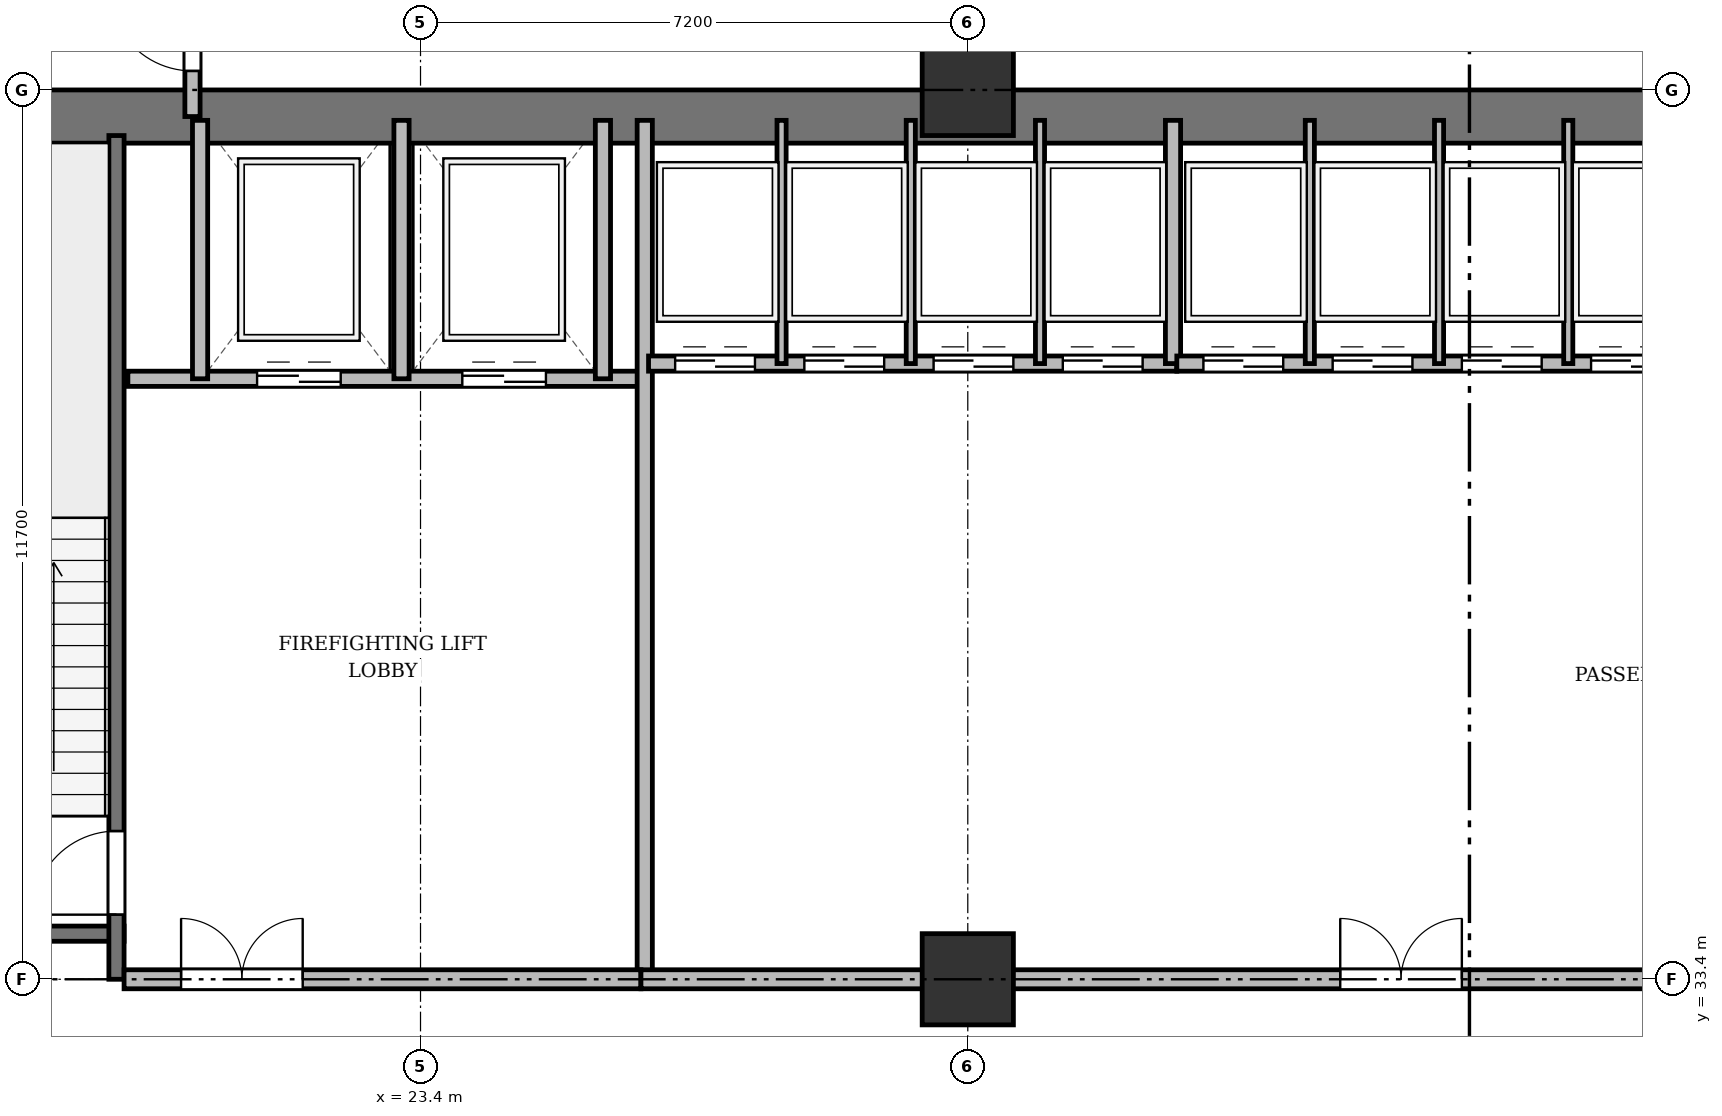
"""IFC4 building model, lengths in metres.
Left out: names, types, materials, properties, quantities, classifications, styles, units other than length and angle.
Written with IfcOpenShell. Run it as: python <this file> out.ifc"""

import sys

from ifc_helpers import new_model, si_unit, direction, frame, frame_2d, origin, origin_2d, place, context, subcontext, project, spatial, rectangle, extrude, source, transform, mapped, element, fill, save


model = new_model("IFC4")
c1 = context("Model", 3, precision=1e-05, world=origin(), true_north=direction((0.0, 1.0)))
c2 = subcontext(c1, "Body", "Model", "MODEL_VIEW")
j1 = project(units=[si_unit("LENGTHUNIT", "METRE"), si_unit("PLANEANGLEUNIT", "RADIAN")], contexts=[c1])
p1 = place(None, origin())
s1 = spatial("IfcSite", under=j1, at=p1, CompositionType="ELEMENT")
p2 = place(p1, origin())
s2 = spatial("IfcBuilding", under=s1, at=p2, CompositionType="ELEMENT")
p3 = place(p2, origin())
s3 = spatial("IfcBuildingStorey", under=s2, at=p3, CompositionType="ELEMENT", Elevation=0.0)
m1 = source(origin(), c2, "Body", "SweptSolid", [
    extrude(rectangle(XDim=1.2, YDim=1.2, at=origin_2d()), origin(), (0.0, 0.0, 1.0), 5.2),
])
for number, where, z_axis, x_axis in (
    (1, (30.6, 33.4, 0.0), (0.0, 0.0, 1.0), (1.0, 0.0, 0.0)),
    (2, (30.6, 45.1, 0.0), (0.0, 0.0, 1.0), (1.0, 0.0, 0.0)),
):
    element("IfcColumn", number, at=place(p3, frame(where, z_axis=z_axis, x_axis=x_axis)), inside=s3, PredefinedType="COLUMN", context=c2, shape_type="MappedRepresentation", body=[
        mapped(m1, transform((0.0, 0.0, 0.0), x_axis=(1.0, 0.0, 0.0), y_axis=(0.0, 1.0, 0.0), z_axis=(0.0, 0.0, 1.0), scale=1.0)),
    ])
p4 = place(p3, frame((15.5, 44.75, 0.0), z_axis=(0.0, 0.0, 1.0), x_axis=(1.0, 0.0, 0.0)))
e3 = element("IfcWall", 3, at=p4, inside=s3, PredefinedType="SHEAR", context=c2, shape_type="SweptSolid", body=[
    extrude(rectangle(XDim=43.4, YDim=0.7, at=frame_2d((21.7, 0.0))), origin(), (0.0, 0.0, 1.0), 4.88),
])
p5 = place(p3, frame((16.1, 34.0, 0.0), z_axis=(0.0, 0.0, 1.0), x_axis=(1.0, 0.0, 0.0)))
e4 = element("IfcWall", 4, at=p5, inside=s3, PredefinedType="SHEAR", context=c2, shape_type="SweptSolid", body=[
    extrude(rectangle(XDim=3.4, YDim=0.2, at=frame_2d((1.7, 0.0))), origin(), (0.0, 0.0, 1.0), 4.88),
])
p6 = place(p3, frame((19.4, 33.4, 0.0), z_axis=(0.0, 0.0, 1.0), x_axis=(0.0, 1.0, 0.0)))
e5 = element("IfcWall", 5, at=p6, inside=s3, PredefinedType="SHEAR", context=c2, shape_type="SweptSolid", body=[
    extrude(rectangle(XDim=11.1, YDim=0.2, at=frame_2d((5.55, 0.0))), origin(), (0.0, 0.0, 1.0), 4.88),
])
p7 = place(p6, frame((0.85, 0.0, 0.0)))
e6 = element("IfcOpeningElement", 6, at=p7, cuts=e5, PredefinedType="OPENING", context=c2, shape_type="SweptSolid", body=[
    extrude(rectangle(XDim=1.1, YDim=2.15, at=frame_2d((0.55, 1.075))), frame((0.0, 0.11, 0.0), z_axis=(0.0, -1.0, 0.0), x_axis=(1.0, 0.0, 0.0)), (0.0, 0.0, 1.0), 0.22),
])
p8 = place(p3, frame((19.55, 41.3, 0.0), z_axis=(0.0, 0.0, 1.0), x_axis=(1.0, 0.0, 0.0)))
e7 = element("IfcWall", 7, at=p8, inside=s3, PredefinedType="SOLIDWALL", context=c2, shape_type="SweptSolid", body=[
    extrude(rectangle(XDim=6.75, YDim=0.2, at=frame_2d((3.375, 0.0))), origin(), (0.0, 0.0, 1.0), 4.88),
])
p9 = place(p8, frame((1.7, 0.0, 0.0)))
e8 = element("IfcOpeningElement", 8, at=p9, cuts=e7, PredefinedType="OPENING", context=c2, shape_type="SweptSolid", body=[
    extrude(rectangle(XDim=1.1, YDim=2.15, at=frame_2d((0.55, 1.075))), frame((0.0, 0.11, 0.0), z_axis=(0.0, -1.0, 0.0), x_axis=(1.0, 0.0, 0.0)), (0.0, 0.0, 1.0), 0.22),
])
p10 = place(p8, frame((4.4, 0.0, 0.0)))
e9 = element("IfcOpeningElement", 9, at=p10, cuts=e7, PredefinedType="OPENING", context=c2, shape_type="SweptSolid", body=[
    extrude(rectangle(XDim=1.1, YDim=2.15, at=frame_2d((0.55, 1.075))), frame((0.0, 0.11, 0.0), z_axis=(0.0, -1.0, 0.0), x_axis=(1.0, 0.0, 0.0)), (0.0, 0.0, 1.0), 0.22),
])
for number, where, z_axis, x_axis in (
    (10, (20.5, 41.3, 0.0), (0.0, 0.0, 1.0), (0.0, 1.0, 0.0)),
    (11, (23.15, 41.3, 0.0), (0.0, 0.0, 1.0), (0.0, 1.0, 0.0)),
    (12, (25.8, 41.3, 0.0), (0.0, 0.0, 1.0), (0.0, 1.0, 0.0)),
):
    element("IfcWall", number, at=place(p3, frame(where, z_axis=z_axis, x_axis=x_axis)), inside=s3, PredefinedType="SOLIDWALL", context=c2, shape_type="SweptSolid", body=[
        extrude(rectangle(XDim=3.4, YDim=0.2, at=frame_2d((1.7, 0.0))), origin(), (0.0, 0.0, 1.0), 4.88),
    ])
p11 = place(p3, frame((26.35, 33.4, 0.0), z_axis=(0.0, 0.0, 1.0), x_axis=(0.0, 1.0, 0.0)))
e13 = element("IfcWall", 13, at=p11, inside=s3, PredefinedType="SOLIDWALL", context=c2, shape_type="SweptSolid", body=[
    extrude(rectangle(XDim=11.3, YDim=0.2, at=frame_2d((5.65, 0.0))), origin(), (0.0, 0.0, 1.0), 3.78),
])
p12 = place(p3, frame((19.5, 33.4, 0.0), z_axis=(0.0, 0.0, 1.0), x_axis=(1.0, 0.0, 0.0)))
e14 = element("IfcWall", 14, at=p12, inside=s3, PredefinedType="PARTITIONING", context=c2, shape_type="SweptSolid", body=[
    extrude(rectangle(XDim=6.8, YDim=0.25, at=frame_2d((3.4, 0.0))), origin(), (0.0, 0.0, 1.0), 3.78),
])
p13 = place(p12, frame((0.75, 0.0, 0.0)))
e15 = element("IfcOpeningElement", 15, at=p13, cuts=e14, PredefinedType="OPENING", context=c2, shape_type="SweptSolid", body=[
    extrude(rectangle(XDim=1.6, YDim=2.2, at=frame_2d((0.8, 1.1))), frame((0.0, 0.135, 0.0), z_axis=(0.0, -1.0, 0.0), x_axis=(1.0, 0.0, 0.0)), (0.0, 0.0, 1.0), 0.27),
])
p14 = place(p3, frame((26.4, 41.5, 0.0), z_axis=(0.0, 0.0, 1.0), x_axis=(1.0, 0.0, 0.0)))
e16 = element("IfcWall", 16, at=p14, inside=s3, PredefinedType="SOLIDWALL", context=c2, shape_type="SweptSolid", body=[
    extrude(rectangle(XDim=6.95, YDim=0.2, at=frame_2d((3.475, 0.0))), origin(), (0.0, 0.0, 1.0), 4.88),
])
p15 = place(p14, frame((0.35, 0.0, 0.0)))
e17 = element("IfcOpeningElement", 17, at=p15, cuts=e16, PredefinedType="OPENING", context=c2, shape_type="SweptSolid", body=[
    extrude(rectangle(XDim=1.05, YDim=2.15, at=frame_2d((0.525, 1.075))), frame((0.0, 0.11, 0.0), z_axis=(0.0, -1.0, 0.0), x_axis=(1.0, 0.0, 0.0)), (0.0, 0.0, 1.0), 0.22),
])
p16 = place(p14, frame((2.05, 0.0, 0.0)))
e18 = element("IfcOpeningElement", 18, at=p16, cuts=e16, PredefinedType="OPENING", context=c2, shape_type="SweptSolid", body=[
    extrude(rectangle(XDim=1.05, YDim=2.15, at=frame_2d((0.525, 1.075))), frame((0.0, 0.11, 0.0), z_axis=(0.0, -1.0, 0.0), x_axis=(1.0, 0.0, 0.0)), (0.0, 0.0, 1.0), 0.22),
])
p17 = place(p14, frame((3.75, 0.0, 0.0)))
e19 = element("IfcOpeningElement", 19, at=p17, cuts=e16, PredefinedType="OPENING", context=c2, shape_type="SweptSolid", body=[
    extrude(rectangle(XDim=1.05, YDim=2.15, at=frame_2d((0.525, 1.075))), frame((0.0, 0.11, 0.0), z_axis=(0.0, -1.0, 0.0), x_axis=(1.0, 0.0, 0.0)), (0.0, 0.0, 1.0), 0.22),
])
p18 = place(p14, frame((5.45, 0.0, 0.0)))
e20 = element("IfcOpeningElement", 20, at=p18, cuts=e16, PredefinedType="OPENING", context=c2, shape_type="SweptSolid", body=[
    extrude(rectangle(XDim=1.05, YDim=2.15, at=frame_2d((0.525, 1.075))), frame((0.0, 0.11, 0.0), z_axis=(0.0, -1.0, 0.0), x_axis=(1.0, 0.0, 0.0)), (0.0, 0.0, 1.0), 0.22),
])
p19 = place(p3, frame((33.3, 41.5, 0.0), z_axis=(0.0, 0.0, 1.0), x_axis=(0.0, 1.0, 0.0)))
e21 = element("IfcWall", 21, at=p19, inside=s3, PredefinedType="SOLIDWALL", context=c2, shape_type="SweptSolid", body=[
    extrude(rectangle(XDim=3.2, YDim=0.2, at=frame_2d((1.6, 0.0))), origin(), (0.0, 0.0, 1.0), 4.88),
])
for number, where, z_axis, x_axis in (
    (22, (28.15, 41.5, 0.0), (0.0, 0.0, 1.0), (0.0, 1.0, 0.0)),
    (23, (29.85, 41.5, 0.0), (0.0, 0.0, 1.0), (0.0, 1.0, 0.0)),
    (24, (31.55, 41.5, 0.0), (0.0, 0.0, 1.0), (0.0, 1.0, 0.0)),
):
    element("IfcWall", number, at=place(p3, frame(where, z_axis=z_axis, x_axis=x_axis)), inside=s3, PredefinedType="PARTITIONING", context=c2, shape_type="SweptSolid", body=[
        extrude(rectangle(XDim=3.2, YDim=0.12, at=frame_2d((1.6, 0.0))), origin(), (0.0, 0.0, 1.0), 4.88),
    ])
p20 = place(p3, frame((33.35, 41.5, 0.0), z_axis=(0.0, 0.0, 1.0), x_axis=(1.0, 0.0, 0.0)))
e25 = element("IfcWall", 25, at=p20, inside=s3, PredefinedType="SOLIDWALL", context=c2, shape_type="SweptSolid", body=[
    extrude(rectangle(XDim=6.9, YDim=0.2, at=frame_2d((3.45, 0.0))), origin(), (0.0, 0.0, 1.0), 4.88),
])
p21 = place(p20, frame((0.35, 0.0, 0.0)))
e26 = element("IfcOpeningElement", 26, at=p21, cuts=e25, PredefinedType="OPENING", context=c2, shape_type="SweptSolid", body=[
    extrude(rectangle(XDim=1.05, YDim=2.15, at=frame_2d((0.525, 1.075))), frame((0.0, 0.11, 0.0), z_axis=(0.0, -1.0, 0.0), x_axis=(1.0, 0.0, 0.0)), (0.0, 0.0, 1.0), 0.22),
])
p22 = place(p20, frame((2.05, 0.0, 0.0)))
e27 = element("IfcOpeningElement", 27, at=p22, cuts=e25, PredefinedType="OPENING", context=c2, shape_type="SweptSolid", body=[
    extrude(rectangle(XDim=1.05, YDim=2.15, at=frame_2d((0.525, 1.075))), frame((0.0, 0.11, 0.0), z_axis=(0.0, -1.0, 0.0), x_axis=(1.0, 0.0, 0.0)), (0.0, 0.0, 1.0), 0.22),
])
p23 = place(p20, frame((3.75, 0.0, 0.0)))
e28 = element("IfcOpeningElement", 28, at=p23, cuts=e25, PredefinedType="OPENING", context=c2, shape_type="SweptSolid", body=[
    extrude(rectangle(XDim=1.05, YDim=2.15, at=frame_2d((0.525, 1.075))), frame((0.0, 0.11, 0.0), z_axis=(0.0, -1.0, 0.0), x_axis=(1.0, 0.0, 0.0)), (0.0, 0.0, 1.0), 0.22),
])
p24 = place(p20, frame((5.45, 0.0, 0.0)))
e29 = element("IfcOpeningElement", 29, at=p24, cuts=e25, PredefinedType="OPENING", context=c2, shape_type="SweptSolid", body=[
    extrude(rectangle(XDim=1.05, YDim=2.15, at=frame_2d((0.525, 1.075))), frame((0.0, 0.11, 0.0), z_axis=(0.0, -1.0, 0.0), x_axis=(1.0, 0.0, 0.0)), (0.0, 0.0, 1.0), 0.22),
])
for number, where, z_axis, x_axis in (
    (30, (35.1, 41.5, 0.0), (0.0, 0.0, 1.0), (0.0, 1.0, 0.0)),
    (31, (36.8, 41.5, 0.0), (0.0, 0.0, 1.0), (0.0, 1.0, 0.0)),
    (32, (38.5, 41.5, 0.0), (0.0, 0.0, 1.0), (0.0, 1.0, 0.0)),
):
    element("IfcWall", number, at=place(p3, frame(where, z_axis=z_axis, x_axis=x_axis)), inside=s3, PredefinedType="PARTITIONING", context=c2, shape_type="SweptSolid", body=[
        extrude(rectangle(XDim=3.2, YDim=0.12, at=frame_2d((1.6, 0.0))), origin(), (0.0, 0.0, 1.0), 4.88),
    ])
p25 = place(p3, frame((26.3, 33.4, 0.0), z_axis=(0.0, 0.0, 1.0), x_axis=(1.0, 0.0, 0.0)))
e33 = element("IfcWall", 33, at=p25, inside=s3, PredefinedType="PARTITIONING", context=c2, shape_type="SweptSolid", body=[
    extrude(rectangle(XDim=20.85, YDim=0.25, at=frame_2d((10.425, 0.0))), origin(), (0.0, 0.0, 1.0), 3.78),
])
p26 = place(p25, frame((9.2, 0.0, 0.0)))
e34 = element("IfcOpeningElement", 34, at=p26, cuts=e33, PredefinedType="OPENING", context=c2, shape_type="SweptSolid", body=[
    extrude(rectangle(XDim=1.6, YDim=2.2, at=frame_2d((0.8, 1.1))), frame((0.0, 0.135, 0.0), z_axis=(0.0, -1.0, 0.0), x_axis=(1.0, 0.0, 0.0)), (0.0, 0.0, 1.0), 0.27),
])
p27 = place(p3, frame((20.4, 44.75, 0.0), z_axis=(0.0, 0.0, 1.0), x_axis=(0.0, 1.0, 0.0)))
e35 = element("IfcWall", 35, at=p27, inside=s3, PredefinedType="PARTITIONING", context=c2, shape_type="SweptSolid", body=[
    extrude(rectangle(XDim=6.65, YDim=0.2, at=frame_2d((3.325, 0.0))), origin(), (0.0, 0.0, 1.0), 3.78),
])
p28 = place(p27, frame((0.6, 0.0, 0.0)))
e36 = element("IfcOpeningElement", 36, at=p28, cuts=e35, PredefinedType="OPENING", context=c2, shape_type="SweptSolid", body=[
    extrude(rectangle(XDim=1.1, YDim=2.15, at=frame_2d((0.55, 1.075))), frame((0.0, 0.11, 0.0), z_axis=(0.0, -1.0, 0.0), x_axis=(1.0, 0.0, 0.0)), (0.0, 0.0, 1.0), 0.22),
])
m2 = source(origin(), c2, "Body", "SweptSolid", [
    extrude(rectangle(XDim=1.1, YDim=2.15, at=frame_2d((0.55, 1.075))), frame((0.0, 0.025, 0.0), z_axis=(0.0, -1.0, 0.0), x_axis=(1.0, 0.0, 0.0)), (0.0, 0.0, 1.0), 0.05),
])
p29 = place(p7, origin())
e37 = element("IfcDoor", 37, at=p29, inside=s3, OperationType="SINGLE_SWING_LEFT", PredefinedType="DOOR", context=c2, shape_type="MappedRepresentation", body=[
    mapped(m2, transform((0.0, 0.0, 0.0), x_axis=(1.0, 0.0, 0.0), y_axis=(0.0, 1.0, 0.0), z_axis=(0.0, 0.0, 1.0), scale=1.0)),
])
fill(e6, e37)
p30 = place(p9, origin())
e38 = element("IfcDoor", 38, at=p30, inside=s3, OperationType="DOUBLE_DOOR_SLIDING", PredefinedType="DOOR", context=c2, shape_type="MappedRepresentation", body=[
    mapped(m2, transform((0.0, 0.0, 0.0), x_axis=(1.0, 0.0, 0.0), y_axis=(0.0, 1.0, 0.0), z_axis=(0.0, 0.0, 1.0), scale=1.0)),
])
fill(e8, e38)
p31 = place(p10, origin())
e39 = element("IfcDoor", 39, at=p31, inside=s3, OperationType="DOUBLE_DOOR_SLIDING", PredefinedType="DOOR", context=c2, shape_type="MappedRepresentation", body=[
    mapped(m2, transform((0.0, 0.0, 0.0), x_axis=(1.0, 0.0, 0.0), y_axis=(0.0, 1.0, 0.0), z_axis=(0.0, 0.0, 1.0), scale=1.0)),
])
fill(e9, e39)
m3 = source(origin(), c2, "Body", "SweptSolid", [
    extrude(rectangle(XDim=1.6, YDim=2.2, at=frame_2d((0.8, 1.1))), frame((0.0, 0.025, 0.0), z_axis=(0.0, -1.0, 0.0), x_axis=(1.0, 0.0, 0.0)), (0.0, 0.0, 1.0), 0.05),
])
p32 = place(p13, origin())
e40 = element("IfcDoor", 40, at=p32, inside=s3, OperationType="DOUBLE_DOOR_SINGLE_SWING", PredefinedType="DOOR", context=c2, shape_type="MappedRepresentation", body=[
    mapped(m3, transform((0.0, 0.0, 0.0), x_axis=(1.0, 0.0, 0.0), y_axis=(0.0, 1.0, 0.0), z_axis=(0.0, 0.0, 1.0), scale=1.0)),
])
fill(e15, e40)
m4 = source(origin(), c2, "Body", "SweptSolid", [
    extrude(rectangle(XDim=1.05, YDim=2.15, at=frame_2d((0.525, 1.075))), frame((0.0, 0.025, 0.0), z_axis=(0.0, -1.0, 0.0), x_axis=(1.0, 0.0, 0.0)), (0.0, 0.0, 1.0), 0.05),
])
p33 = place(p15, origin())
e41 = element("IfcDoor", 41, at=p33, inside=s3, OperationType="DOUBLE_DOOR_SLIDING", PredefinedType="DOOR", context=c2, shape_type="MappedRepresentation", body=[
    mapped(m4, transform((0.0, 0.0, 0.0), x_axis=(1.0, 0.0, 0.0), y_axis=(0.0, 1.0, 0.0), z_axis=(0.0, 0.0, 1.0), scale=1.0)),
])
fill(e17, e41)
p34 = place(p16, origin())
e42 = element("IfcDoor", 42, at=p34, inside=s3, OperationType="DOUBLE_DOOR_SLIDING", PredefinedType="DOOR", context=c2, shape_type="MappedRepresentation", body=[
    mapped(m4, transform((0.0, 0.0, 0.0), x_axis=(1.0, 0.0, 0.0), y_axis=(0.0, 1.0, 0.0), z_axis=(0.0, 0.0, 1.0), scale=1.0)),
])
fill(e18, e42)
p35 = place(p17, origin())
e43 = element("IfcDoor", 43, at=p35, inside=s3, OperationType="DOUBLE_DOOR_SLIDING", PredefinedType="DOOR", context=c2, shape_type="MappedRepresentation", body=[
    mapped(m4, transform((0.0, 0.0, 0.0), x_axis=(1.0, 0.0, 0.0), y_axis=(0.0, 1.0, 0.0), z_axis=(0.0, 0.0, 1.0), scale=1.0)),
])
fill(e19, e43)
p36 = place(p18, origin())
e44 = element("IfcDoor", 44, at=p36, inside=s3, OperationType="DOUBLE_DOOR_SLIDING", PredefinedType="DOOR", context=c2, shape_type="MappedRepresentation", body=[
    mapped(m4, transform((0.0, 0.0, 0.0), x_axis=(1.0, 0.0, 0.0), y_axis=(0.0, 1.0, 0.0), z_axis=(0.0, 0.0, 1.0), scale=1.0)),
])
fill(e20, e44)
p37 = place(p21, origin())
e45 = element("IfcDoor", 45, at=p37, inside=s3, OperationType="DOUBLE_DOOR_SLIDING", PredefinedType="DOOR", context=c2, shape_type="MappedRepresentation", body=[
    mapped(m4, transform((0.0, 0.0, 0.0), x_axis=(1.0, 0.0, 0.0), y_axis=(0.0, 1.0, 0.0), z_axis=(0.0, 0.0, 1.0), scale=1.0)),
])
fill(e26, e45)
p38 = place(p22, origin())
e46 = element("IfcDoor", 46, at=p38, inside=s3, OperationType="DOUBLE_DOOR_SLIDING", PredefinedType="DOOR", context=c2, shape_type="MappedRepresentation", body=[
    mapped(m4, transform((0.0, 0.0, 0.0), x_axis=(1.0, 0.0, 0.0), y_axis=(0.0, 1.0, 0.0), z_axis=(0.0, 0.0, 1.0), scale=1.0)),
])
fill(e27, e46)
p39 = place(p23, origin())
e47 = element("IfcDoor", 47, at=p39, inside=s3, OperationType="DOUBLE_DOOR_SLIDING", PredefinedType="DOOR", context=c2, shape_type="MappedRepresentation", body=[
    mapped(m4, transform((0.0, 0.0, 0.0), x_axis=(1.0, 0.0, 0.0), y_axis=(0.0, 1.0, 0.0), z_axis=(0.0, 0.0, 1.0), scale=1.0)),
])
fill(e28, e47)
p40 = place(p24, origin())
e48 = element("IfcDoor", 48, at=p40, inside=s3, OperationType="DOUBLE_DOOR_SLIDING", PredefinedType="DOOR", context=c2, shape_type="MappedRepresentation", body=[
    mapped(m4, transform((0.0, 0.0, 0.0), x_axis=(1.0, 0.0, 0.0), y_axis=(0.0, 1.0, 0.0), z_axis=(0.0, 0.0, 1.0), scale=1.0)),
])
fill(e29, e48)
p41 = place(p26, origin())
e49 = element("IfcDoor", 49, at=p41, inside=s3, OperationType="DOUBLE_DOOR_SINGLE_SWING", PredefinedType="DOOR", context=c2, shape_type="MappedRepresentation", body=[
    mapped(m3, transform((0.0, 0.0, 0.0), x_axis=(1.0, 0.0, 0.0), y_axis=(0.0, 1.0, 0.0), z_axis=(0.0, 0.0, 1.0), scale=1.0)),
])
fill(e34, e49)
p42 = place(p28, origin())
e50 = element("IfcDoor", 50, at=p42, inside=s3, OperationType="SINGLE_SWING_RIGHT", PredefinedType="DOOR", context=c2, shape_type="MappedRepresentation", body=[
    mapped(m2, transform((0.0, 0.0, 0.0), x_axis=(1.0, 0.0, 0.0), y_axis=(0.0, 1.0, 0.0), z_axis=(0.0, 0.0, 1.0), scale=1.0)),
])
fill(e36, e50)
save(model, sys.argv[1])
